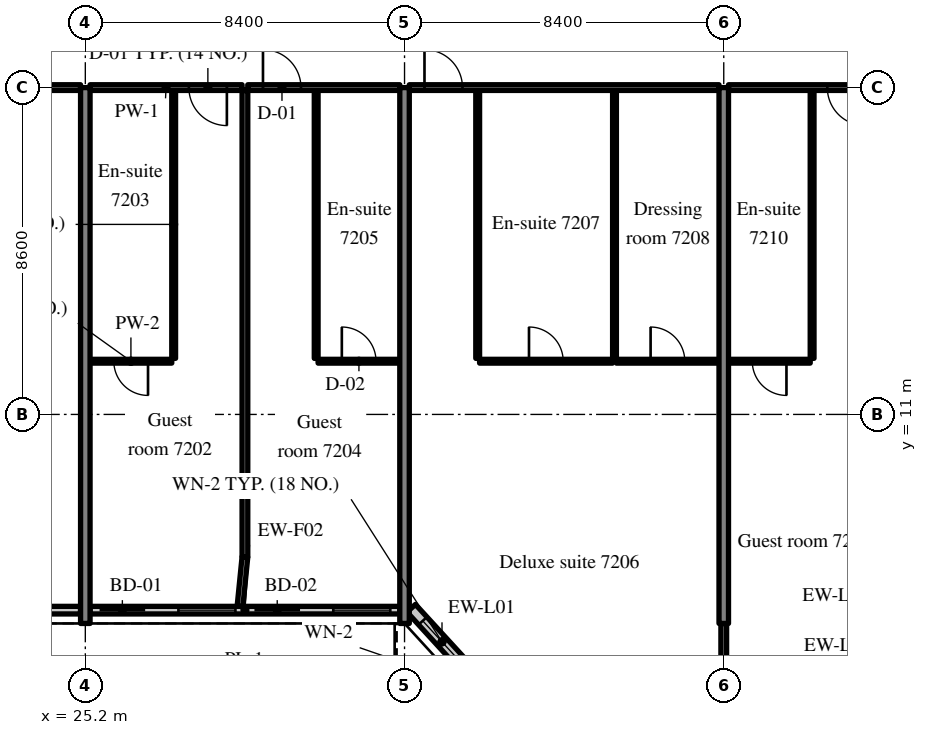
"""IFC4 building model, lengths in metres.
Left out: names, types, materials, properties, quantities, classifications, styles, units other than length and angle.
Written with IfcOpenShell. Run it as: python <this file> out.ifc"""

import sys

from ifc_helpers import new_model, si_unit, direction, frame, frame_2d, origin, place, context, subcontext, project, spatial, rectangle, extrude, source, transform, mapped, element, fill, save


model = new_model("IFC4")
c1 = context("Model", 3, precision=1e-05, world=origin(), true_north=direction((0.0, 1.0)))
c2 = subcontext(c1, "Body", "Model", "MODEL_VIEW")
j1 = project(units=[si_unit("LENGTHUNIT", "METRE"), si_unit("PLANEANGLEUNIT", "RADIAN")], contexts=[c1])
p1 = place(None, origin())
s1 = spatial("IfcSite", under=j1, at=p1, CompositionType="ELEMENT")
p2 = place(p1, origin())
s2 = spatial("IfcBuilding", under=s1, at=p2, CompositionType="ELEMENT")
p3 = place(p2, frame((0.0, 0.0, 301.7)))
s3 = spatial("IfcBuildingStorey", under=s2, at=p3, CompositionType="ELEMENT", Elevation=301.7)
m1 = source(origin(), c2, "Body", "SweptSolid", [
    extrude(rectangle(XDim=14.1, YDim=0.25, at=frame_2d((7.05, 0.0))), origin(), (0.0, 0.0, 1.0), 3.72),
])
for number, where, z_axis, x_axis in (
    (1, (25.2, 5.5, 0.0), (0.0, 0.0, 1.0), (0.0, 1.0, 0.0)),
    (2, (33.6, 5.5, 0.0), (0.0, 0.0, 1.0), (0.0, 1.0, 0.0)),
    (3, (42.0, 5.5, 0.0), (0.0, 0.0, 1.0), (0.0, 1.0, 0.0)),
):
    element("IfcWall", number, at=place(p3, frame(where, z_axis=z_axis, x_axis=x_axis)), inside=s3, PredefinedType="SHEAR", context=c2, shape_type="MappedRepresentation", body=[
        mapped(m1, transform((0.0, 0.0, 0.0), scale=1.0)),
    ])
m2 = source(origin(), c2, "Body", "SweptSolid", [
    extrude(rectangle(XDim=6.53, YDim=0.2, at=frame_2d((3.265, 0.0))), origin(), (0.0, 0.0, 1.0), 3.17),
])
p4 = place(p3, frame((18.545, 5.85, 0.0), z_axis=(0.0, 0.0, 1.0), x_axis=(1.0, 0.0, 0.0)))
e4 = element("IfcWall", 4, at=p4, inside=s3, PredefinedType="SOLIDWALL", context=c2, shape_type="MappedRepresentation", body=[
    mapped(m2, transform((0.0, 0.0, 0.0), scale=1.0)),
])
m3 = source(origin(), c2, "Body", "SweptSolid", [
    extrude(rectangle(XDim=1.5, YDim=1.5, at=frame_2d((0.75, 0.75))), frame((0.0, 0.11, 0.0), z_axis=(0.0, -1.0, 0.0), x_axis=(1.0, 0.0, 0.0)), (0.0, 0.0, 1.0), 0.22),
])
p5 = place(p4, frame((0.883, 0.0, 0.9)))
e5 = element("IfcOpeningElement", 5, at=p5, cuts=e4, PredefinedType="OPENING", context=c2, shape_type="MappedRepresentation", body=[
    mapped(m3, transform((0.0, 0.0, 0.0), scale=1.0)),
])
p6 = place(p4, frame((4.147, 0.0, 0.9)))
e6 = element("IfcOpeningElement", 6, at=p6, cuts=e4, PredefinedType="OPENING", context=c2, shape_type="MappedRepresentation", body=[
    mapped(m3, transform((0.0, 0.0, 0.0), scale=1.0)),
])
m4 = source(origin(), c2, "Body", "SweptSolid", [
    extrude(rectangle(XDim=8.15, YDim=0.2, at=frame_2d((4.075, 0.0))), origin(), (0.0, 0.0, 1.0), 3.17),
])
p7 = place(p3, frame((25.325, 5.85, 0.0), z_axis=(0.0, 0.0, 1.0), x_axis=(1.0, 0.0, 0.0)))
e7 = element("IfcWall", 7, at=p7, inside=s3, PredefinedType="SOLIDWALL", context=c2, shape_type="MappedRepresentation", body=[
    mapped(m4, transform((0.0, 0.0, 0.0), scale=1.0)),
])
m5 = source(origin(), c2, "Body", "SweptSolid", [
    extrude(rectangle(XDim=1.2, YDim=2.4, at=frame_2d((0.6, 1.2))), frame((0.0, 0.11, 0.0), z_axis=(0.0, -1.0, 0.0), x_axis=(1.0, 0.0, 0.0)), (0.0, 0.0, 1.0), 0.22),
])
p8 = place(p7, frame((0.25, 0.0, 0.0)))
e8 = element("IfcOpeningElement", 8, at=p8, cuts=e7, PredefinedType="OPENING", context=c2, shape_type="MappedRepresentation", body=[
    mapped(m5, transform((0.0, 0.0, 0.0), scale=1.0)),
])
p9 = place(p7, frame((2.325, 0.0, 0.9)))
e9 = element("IfcOpeningElement", 9, at=p9, cuts=e7, PredefinedType="OPENING", context=c2, shape_type="MappedRepresentation", body=[
    mapped(m3, transform((0.0, 0.0, 0.0), scale=1.0)),
])
p10 = place(p7, frame((4.325, 0.0, 0.0)))
e10 = element("IfcOpeningElement", 10, at=p10, cuts=e7, PredefinedType="OPENING", context=c2, shape_type="MappedRepresentation", body=[
    mapped(m5, transform((0.0, 0.0, 0.0), scale=1.0)),
])
p11 = place(p7, frame((6.4, 0.0, 0.9)))
e11 = element("IfcOpeningElement", 11, at=p11, cuts=e7, PredefinedType="OPENING", context=c2, shape_type="MappedRepresentation", body=[
    mapped(m3, transform((0.0, 0.0, 0.0), scale=1.0)),
])
m6 = source(origin(), c2, "Body", "SweptSolid", [
    extrude(rectangle(XDim=2.398, YDim=0.3, at=frame_2d((1.199, 0.0))), origin(), (0.0, 0.0, 1.0), 3.72),
])
p12 = place(p3, frame((33.776, 5.9, 0.0), z_axis=(0.0, 0.0, 1.0), x_axis=(0.675374189419, -0.737475222815, 0.0)))
e12 = element("IfcWall", 12, at=p12, inside=s3, PredefinedType="SOLIDWALL", context=c2, shape_type="MappedRepresentation", body=[
    mapped(m6, transform((0.0, 0.0, 0.0), scale=1.0)),
])
m7 = source(origin(), c2, "Body", "SweptSolid", [
    extrude(rectangle(XDim=1.5, YDim=2.0, at=frame_2d((0.75, 1.0))), frame((0.0, 0.16, 0.0), z_axis=(0.0, -1.0, 0.0), x_axis=(1.0, 0.0, 0.0)), (0.0, 0.0, 1.0), 0.32),
])
p13 = place(p12, frame((0.449, 0.0, 0.9)))
e13 = element("IfcOpeningElement", 13, at=p13, cuts=e12, PredefinedType="OPENING", context=c2, shape_type="MappedRepresentation", body=[
    mapped(m7, transform((0.0, 0.0, 0.0), scale=1.0)),
])
m8 = source(origin(), c2, "Body", "SweptSolid", [
    extrude(rectangle(XDim=8.025, YDim=0.15, at=frame_2d((4.012, 0.0))), origin(), (0.0, 0.0, 1.0), 3.02),
])
p14 = place(p3, frame((17.05, 19.6, 0.0), z_axis=(0.0, 0.0, 1.0), x_axis=(1.0, 0.0, 0.0)))
e14 = element("IfcWall", 14, at=p14, inside=s3, PredefinedType="PARTITIONING", context=c2, shape_type="MappedRepresentation", body=[
    mapped(m8, transform((0.0, 0.0, 0.0), scale=1.0)),
])
m9 = source(origin(), c2, "Body", "SweptSolid", [
    extrude(rectangle(XDim=1.8, YDim=2.1, at=frame_2d((0.9, 1.05))), frame((0.0, 0.085, 0.0), z_axis=(0.0, -1.0, 0.0), x_axis=(1.0, 0.0, 0.0)), (0.0, 0.0, 1.0), 0.17),
])
p15 = place(p14, frame((3.113, 0.0, 0.0)))
e15 = element("IfcOpeningElement", 15, at=p15, cuts=e14, PredefinedType="OPENING", context=c2, shape_type="MappedRepresentation", body=[
    mapped(m9, transform((0.0, 0.0, 0.0), scale=1.0)),
])
m10 = source(origin(), c2, "Body", "SweptSolid", [
    extrude(rectangle(XDim=7.05, YDim=0.1, at=frame_2d((3.525, 0.0))), origin(), (0.0, 0.0, 1.0), 3.72),
])
p16 = place(p3, frame((27.525, 12.475, 0.0), z_axis=(0.0, 0.0, 1.0), x_axis=(0.0, 1.0, 0.0)))
e16 = element("IfcWall", 16, at=p16, inside=s3, PredefinedType="PARTITIONING", context=c2, shape_type="MappedRepresentation", body=[
    mapped(m10, transform((0.0, 0.0, 0.0), scale=1.0)),
])
m11 = source(origin(), c2, "Body", "SweptSolid", [
    extrude(rectangle(XDim=2.15, YDim=0.1, at=frame_2d((1.075, 0.0))), origin(), (0.0, 0.0, 1.0), 3.72),
])
p17 = place(p3, frame((25.325, 12.4, 0.0), z_axis=(0.0, 0.0, 1.0), x_axis=(1.0, 0.0, 0.0)))
e17 = element("IfcWall", 17, at=p17, inside=s3, PredefinedType="PARTITIONING", context=c2, shape_type="MappedRepresentation", body=[
    mapped(m11, transform((0.0, 0.0, 0.0), scale=1.0)),
])
m12 = source(origin(), c2, "Body", "SweptSolid", [
    extrude(rectangle(XDim=0.9, YDim=2.1, at=frame_2d((0.45, 1.05))), frame((0.0, 0.06, 0.0), z_axis=(0.0, -1.0, 0.0), x_axis=(1.0, 0.0, 0.0)), (0.0, 0.0, 1.0), 0.12),
])
p18 = place(p17, frame((0.625, 0.0, 0.0)))
e18 = element("IfcOpeningElement", 18, at=p18, cuts=e17, PredefinedType="OPENING", context=c2, shape_type="MappedRepresentation", body=[
    mapped(m12, transform((0.0, 0.0, 0.0), scale=1.0)),
])
m13 = source(origin(), c2, "Body", "SweptSolid", [
    extrude(rectangle(XDim=4.0, YDim=0.15, at=frame_2d((2.0, 0.0))), origin(), (0.0, 0.0, 1.0), 3.02),
])
p19 = place(p3, frame((25.325, 19.6, 0.0), z_axis=(0.0, 0.0, 1.0), x_axis=(1.0, 0.0, 0.0)))
e19 = element("IfcWall", 19, at=p19, inside=s3, PredefinedType="PARTITIONING", context=c2, shape_type="MappedRepresentation", body=[
    mapped(m13, transform((0.0, 0.0, 0.0), scale=1.0)),
])
m14 = source(origin(), c2, "Body", "SweptSolid", [
    extrude(rectangle(XDim=1.0, YDim=2.1, at=frame_2d((0.5, 1.05))), frame((0.0, 0.085, 0.0), z_axis=(0.0, -1.0, 0.0), x_axis=(1.0, 0.0, 0.0)), (0.0, 0.0, 1.0), 0.17),
])
p20 = place(p19, frame((2.6, 0.0, 0.0)))
e20 = element("IfcOpeningElement", 20, at=p20, cuts=e19, PredefinedType="OPENING", context=c2, shape_type="MappedRepresentation", body=[
    mapped(m14, transform((0.0, 0.0, 0.0), scale=1.0)),
])
p21 = place(p3, frame((31.275, 12.475, 0.0), z_axis=(0.0, 0.0, 1.0), x_axis=(0.0, 1.0, 0.0)))
e21 = element("IfcWall", 21, at=p21, inside=s3, PredefinedType="PARTITIONING", context=c2, shape_type="MappedRepresentation", body=[
    mapped(m10, transform((0.0, 0.0, 0.0), scale=1.0)),
])
p22 = place(p3, frame((31.325, 12.4, 0.0), z_axis=(0.0, 0.0, 1.0), x_axis=(1.0, 0.0, 0.0)))
e22 = element("IfcWall", 22, at=p22, inside=s3, PredefinedType="PARTITIONING", context=c2, shape_type="MappedRepresentation", body=[
    mapped(m11, transform((0.0, 0.0, 0.0), scale=1.0)),
])
p23 = place(p22, frame((0.625, 0.0, 0.0)))
e23 = element("IfcOpeningElement", 23, at=p23, cuts=e22, PredefinedType="OPENING", context=c2, shape_type="MappedRepresentation", body=[
    mapped(m12, transform((0.0, 0.0, 0.0), scale=1.0)),
])
p24 = place(p3, frame((29.475, 19.6, 0.0), z_axis=(0.0, 0.0, 1.0), x_axis=(1.0, 0.0, 0.0)))
e24 = element("IfcWall", 24, at=p24, inside=s3, PredefinedType="PARTITIONING", context=c2, shape_type="MappedRepresentation", body=[
    mapped(m13, transform((0.0, 0.0, 0.0), scale=1.0)),
])
p25 = place(p24, frame((0.4, 0.0, 0.0)))
e25 = element("IfcOpeningElement", 25, at=p25, cuts=e24, PredefinedType="OPENING", context=c2, shape_type="MappedRepresentation", body=[
    mapped(m14, transform((0.0, 0.0, 0.0), scale=1.0)),
])
m15 = source(origin(), c2, "Body", "SweptSolid", [
    extrude(rectangle(XDim=12.275, YDim=0.15, at=frame_2d((6.137, 0.0))), origin(), (0.0, 0.0, 1.0), 3.72),
])
p26 = place(p3, frame((29.4, 7.25, 0.0), z_axis=(0.0, 0.0, 1.0), x_axis=(0.0, 1.0, 0.0)))
e26 = element("IfcWall", 26, at=p26, inside=s3, PredefinedType="PARTITIONING", context=c2, shape_type="MappedRepresentation", body=[
    mapped(m15, transform((0.0, 0.0, 0.0), scale=1.0)),
])
for number, where, z_axis, x_axis in (
    (27, (35.525, 12.475, 0.0), (0.0, 0.0, 1.0), (0.0, 1.0, 0.0)),
    (28, (39.125, 12.475, 0.0), (0.0, 0.0, 1.0), (0.0, 1.0, 0.0)),
):
    element("IfcWall", number, at=place(p3, frame(where, z_axis=z_axis, x_axis=x_axis)), inside=s3, PredefinedType="PARTITIONING", context=c2, shape_type="MappedRepresentation", body=[
        mapped(m10, transform((0.0, 0.0, 0.0), scale=1.0)),
    ])
m16 = source(origin(), c2, "Body", "SweptSolid", [
    extrude(rectangle(XDim=3.5, YDim=0.1, at=frame_2d((1.75, 0.0))), origin(), (0.0, 0.0, 1.0), 3.72),
])
p27 = place(p3, frame((35.575, 12.4, 0.0), z_axis=(0.0, 0.0, 1.0), x_axis=(1.0, 0.0, 0.0)))
e29 = element("IfcWall", 29, at=p27, inside=s3, PredefinedType="PARTITIONING", context=c2, shape_type="MappedRepresentation", body=[
    mapped(m16, transform((0.0, 0.0, 0.0), scale=1.0)),
])
p28 = place(p27, frame((1.3, 0.0, 0.0)))
e30 = element("IfcOpeningElement", 30, at=p28, cuts=e29, PredefinedType="OPENING", context=c2, shape_type="MappedRepresentation", body=[
    mapped(m12, transform((0.0, 0.0, 0.0), scale=1.0)),
])
m17 = source(origin(), c2, "Body", "SweptSolid", [
    extrude(rectangle(XDim=2.7, YDim=0.1, at=frame_2d((1.35, 0.0))), origin(), (0.0, 0.0, 1.0), 3.72),
])
p29 = place(p3, frame((39.175, 12.4, 0.0), z_axis=(0.0, 0.0, 1.0), x_axis=(1.0, 0.0, 0.0)))
e31 = element("IfcWall", 31, at=p29, inside=s3, PredefinedType="PARTITIONING", context=c2, shape_type="MappedRepresentation", body=[
    mapped(m17, transform((0.0, 0.0, 0.0), scale=1.0)),
])
p30 = place(p29, frame((0.9, 0.0, 0.0)))
e32 = element("IfcOpeningElement", 32, at=p30, cuts=e31, PredefinedType="OPENING", context=c2, shape_type="MappedRepresentation", body=[
    mapped(m12, transform((0.0, 0.0, 0.0), scale=1.0)),
])
m18 = source(origin(), c2, "Body", "SweptSolid", [
    extrude(rectangle(XDim=8.15, YDim=0.15, at=frame_2d((4.075, 0.0))), origin(), (0.0, 0.0, 1.0), 3.02),
])
p31 = place(p3, frame((33.725, 19.6, 0.0), z_axis=(0.0, 0.0, 1.0), x_axis=(1.0, 0.0, 0.0)))
e33 = element("IfcWall", 33, at=p31, inside=s3, PredefinedType="PARTITIONING", context=c2, shape_type="MappedRepresentation", body=[
    mapped(m18, transform((0.0, 0.0, 0.0), scale=1.0)),
])
p32 = place(p31, frame((0.4, 0.0, 0.0)))
e34 = element("IfcOpeningElement", 34, at=p32, cuts=e33, PredefinedType="OPENING", context=c2, shape_type="MappedRepresentation", body=[
    mapped(m14, transform((0.0, 0.0, 0.0), scale=1.0)),
])
p33 = place(p3, frame((44.325, 12.475, 0.0), z_axis=(0.0, 0.0, 1.0), x_axis=(0.0, 1.0, 0.0)))
e35 = element("IfcWall", 35, at=p33, inside=s3, PredefinedType="PARTITIONING", context=c2, shape_type="MappedRepresentation", body=[
    mapped(m10, transform((0.0, 0.0, 0.0), scale=1.0)),
])
m19 = source(origin(), c2, "Body", "SweptSolid", [
    extrude(rectangle(XDim=2.15, YDim=0.1, at=frame_2d((1.075, 0.0))), origin(), (0.0, 0.0, 1.0), 3.72),
])
p34 = place(p3, frame((42.125, 12.4, 0.0), z_axis=(0.0, 0.0, 1.0), x_axis=(1.0, 0.0, 0.0)))
e36 = element("IfcWall", 36, at=p34, inside=s3, PredefinedType="PARTITIONING", context=c2, shape_type="MappedRepresentation", body=[
    mapped(m19, transform((0.0, 0.0, 0.0), scale=1.0)),
])
p35 = place(p34, frame((0.625, 0.0, 0.0)))
e37 = element("IfcOpeningElement", 37, at=p35, cuts=e36, PredefinedType="OPENING", context=c2, shape_type="MappedRepresentation", body=[
    mapped(m12, transform((0.0, 0.0, 0.0), scale=1.0)),
])
p36 = place(p3, frame((42.125, 19.6, 0.0), z_axis=(0.0, 0.0, 1.0), x_axis=(1.0, 0.0, 0.0)))
e38 = element("IfcWall", 38, at=p36, inside=s3, PredefinedType="PARTITIONING", context=c2, shape_type="MappedRepresentation", body=[
    mapped(m13, transform((0.0, 0.0, 0.0), scale=1.0)),
])
p37 = place(p36, frame((2.6, 0.0, 0.0)))
e39 = element("IfcOpeningElement", 39, at=p37, cuts=e38, PredefinedType="OPENING", context=c2, shape_type="MappedRepresentation", body=[
    mapped(m14, transform((0.0, 0.0, 0.0), scale=1.0)),
])
m20 = source(origin(), c2, "Body", "SweptSolid", [
    extrude(rectangle(XDim=2.178, YDim=0.15, at=frame_2d((1.089, 0.0))), origin(), (0.0, 0.0, 1.0), 3.72),
])
p38 = place(p3, frame((42.0, 3.322, 0.0), z_axis=(0.0, 0.0, 1.0), x_axis=(0.0, 1.0, 0.0)))
e40 = element("IfcWall", 40, at=p38, inside=s3, PredefinedType="PARTITIONING", context=c2, shape_type="MappedRepresentation", body=[
    mapped(m20, transform((0.0, 0.0, 0.0), scale=1.0)),
])
m21 = source(origin(), c2, "Body", "SweptSolid", [
    extrude(rectangle(XDim=1.307, YDim=0.15, at=frame_2d((0.653, 0.0))), origin(), (0.0, 0.0, 1.0), 3.72),
])
p39 = place(p3, frame((29.27, 5.95, 0.0), z_axis=(0.0, 0.0, 1.0), x_axis=(0.099411212066, 0.995046436562, 0.0)))
e41 = element("IfcWall", 41, at=p39, inside=s3, PredefinedType="PARTITIONING", context=c2, shape_type="MappedRepresentation", body=[
    mapped(m21, transform((0.0, 0.0, 0.0), scale=1.0)),
])
m22 = source(origin(), c2, "Body", "SweptSolid", [
    extrude(rectangle(XDim=1.2, YDim=2.4, at=frame_2d((0.6, 1.2))), frame((0.0, 0.025, 0.0), z_axis=(0.0, -1.0, 0.0), x_axis=(1.0, 0.0, 0.0)), (0.0, 0.0, 1.0), 0.05),
])
p40 = place(p8, origin())
e42 = element("IfcDoor", 42, at=p40, inside=s3, OperationType="SLIDING_TO_LEFT", PredefinedType="DOOR", context=c2, shape_type="MappedRepresentation", body=[
    mapped(m22, transform((0.0, 0.0, 0.0), scale=1.0)),
])
fill(e8, e42)
m23 = source(origin(), c2, "Body", "SweptSolid", [
    extrude(rectangle(XDim=1.5, YDim=1.5, at=frame_2d((0.75, 0.75))), frame((0.0, 0.03, 0.0), z_axis=(0.0, -1.0, 0.0), x_axis=(1.0, 0.0, 0.0)), (0.0, 0.0, 1.0), 0.06),
])
p41 = place(p9, origin())
e43 = element("IfcWindow", 43, at=p41, inside=s3, PartitioningType="SINGLE_PANEL", PredefinedType="WINDOW", context=c2, shape_type="MappedRepresentation", body=[
    mapped(m23, transform((0.0, 0.0, 0.0), scale=1.0)),
])
fill(e9, e43)
p42 = place(p10, origin())
e44 = element("IfcDoor", 44, at=p42, inside=s3, OperationType="SLIDING_TO_RIGHT", PredefinedType="DOOR", context=c2, shape_type="MappedRepresentation", body=[
    mapped(m22, transform((0.0, 0.0, 0.0), scale=1.0)),
])
fill(e10, e44)
p43 = place(p11, origin())
e45 = element("IfcWindow", 45, at=p43, inside=s3, PartitioningType="SINGLE_PANEL", PredefinedType="WINDOW", context=c2, shape_type="MappedRepresentation", body=[
    mapped(m23, transform((0.0, 0.0, 0.0), scale=1.0)),
])
fill(e11, e45)
m24 = source(origin(), c2, "Body", "SweptSolid", [
    extrude(rectangle(XDim=1.5, YDim=2.0, at=frame_2d((0.75, 1.0))), frame((0.0, 0.03, 0.0), z_axis=(0.0, -1.0, 0.0), x_axis=(1.0, 0.0, 0.0)), (0.0, 0.0, 1.0), 0.06),
])
p44 = place(p13, origin())
e46 = element("IfcWindow", 46, at=p44, inside=s3, PartitioningType="SINGLE_PANEL", PredefinedType="WINDOW", context=c2, shape_type="MappedRepresentation", body=[
    mapped(m24, transform((0.0, 0.0, 0.0), scale=1.0)),
])
fill(e13, e46)
m25 = source(origin(), c2, "Body", "SweptSolid", [
    extrude(rectangle(XDim=0.9, YDim=2.1, at=frame_2d((0.45, 1.05))), frame((0.0, 0.025, 0.0), z_axis=(0.0, -1.0, 0.0), x_axis=(1.0, 0.0, 0.0)), (0.0, 0.0, 1.0), 0.05),
])
p45 = place(p18, origin())
e47 = element("IfcDoor", 47, at=p45, inside=s3, OperationType="SINGLE_SWING_RIGHT", PredefinedType="DOOR", context=c2, shape_type="MappedRepresentation", body=[
    mapped(m25, transform((0.0, 0.0, 0.0), scale=1.0)),
])
fill(e18, e47)
m26 = source(origin(), c2, "Body", "SweptSolid", [
    extrude(rectangle(XDim=1.0, YDim=2.1, at=frame_2d((0.5, 1.05))), frame((0.0, 0.025, 0.0), z_axis=(0.0, -1.0, 0.0), x_axis=(1.0, 0.0, 0.0)), (0.0, 0.0, 1.0), 0.05),
])
p46 = place(p20, origin())
e48 = element("IfcDoor", 48, at=p46, inside=s3, OperationType="SINGLE_SWING_RIGHT", PredefinedType="DOOR", context=c2, shape_type="MappedRepresentation", body=[
    mapped(m26, transform((0.0, 0.0, 0.0), scale=1.0)),
])
fill(e20, e48)
p47 = place(p23, origin())
e49 = element("IfcDoor", 49, at=p47, inside=s3, OperationType="SINGLE_SWING_LEFT", PredefinedType="DOOR", context=c2, shape_type="MappedRepresentation", body=[
    mapped(m25, transform((0.0, 0.0, 0.0), scale=1.0)),
])
fill(e23, e49)
p48 = place(p25, origin())
e50 = element("IfcDoor", 50, at=p48, inside=s3, OperationType="SINGLE_SWING_LEFT", PredefinedType="DOOR", context=c2, shape_type="MappedRepresentation", body=[
    mapped(m26, transform((0.0, 0.0, 0.0), scale=1.0)),
])
fill(e25, e50)
p49 = place(p28, origin())
e51 = element("IfcDoor", 51, at=p49, inside=s3, OperationType="SINGLE_SWING_LEFT", PredefinedType="DOOR", context=c2, shape_type="MappedRepresentation", body=[
    mapped(m25, transform((0.0, 0.0, 0.0), scale=1.0)),
])
fill(e30, e51)
p50 = place(p30, origin())
e52 = element("IfcDoor", 52, at=p50, inside=s3, OperationType="SINGLE_SWING_LEFT", PredefinedType="DOOR", context=c2, shape_type="MappedRepresentation", body=[
    mapped(m25, transform((0.0, 0.0, 0.0), scale=1.0)),
])
fill(e32, e52)
p51 = place(p32, origin())
e53 = element("IfcDoor", 53, at=p51, inside=s3, OperationType="SINGLE_SWING_LEFT", PredefinedType="DOOR", context=c2, shape_type="MappedRepresentation", body=[
    mapped(m26, transform((0.0, 0.0, 0.0), scale=1.0)),
])
fill(e34, e53)
p52 = place(p35, origin())
e54 = element("IfcDoor", 54, at=p52, inside=s3, OperationType="SINGLE_SWING_RIGHT", PredefinedType="DOOR", context=c2, shape_type="MappedRepresentation", body=[
    mapped(m25, transform((0.0, 0.0, 0.0), scale=1.0)),
])
fill(e37, e54)
p53 = place(p37, origin())
e55 = element("IfcDoor", 55, at=p53, inside=s3, OperationType="SINGLE_SWING_RIGHT", PredefinedType="DOOR", context=c2, shape_type="MappedRepresentation", body=[
    mapped(m26, transform((0.0, 0.0, 0.0), scale=1.0)),
])
fill(e39, e55)
save(model, sys.argv[1])
